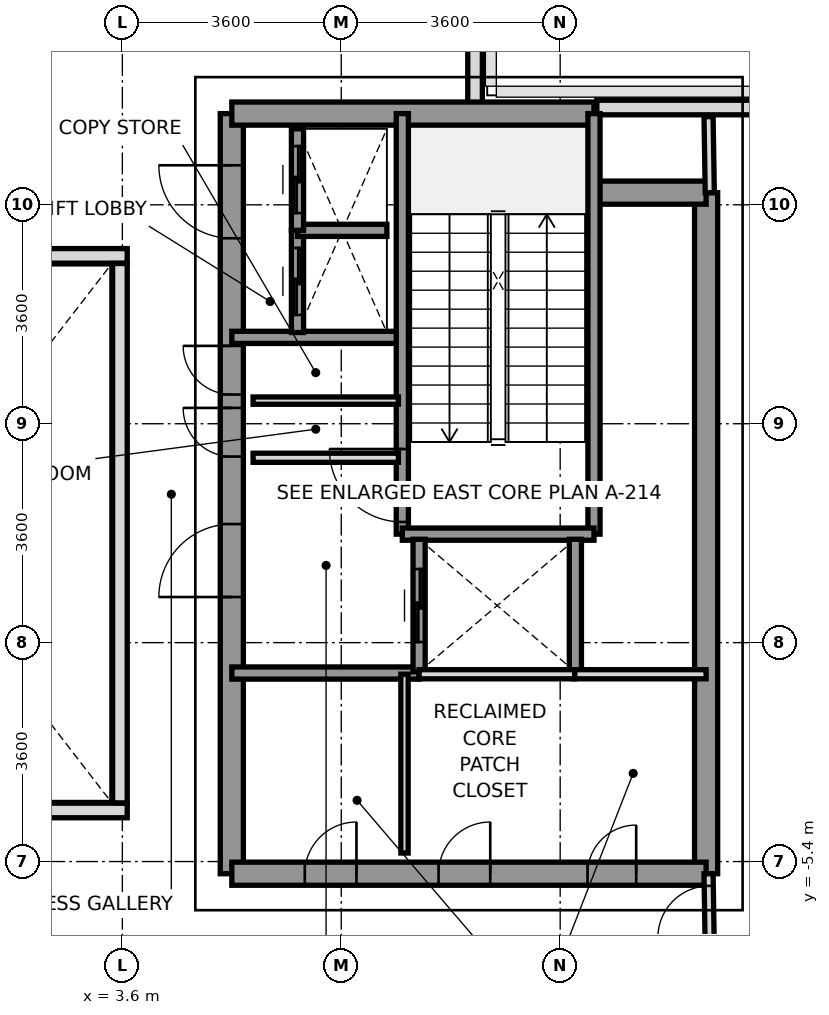
"""IFC4 building model, lengths in metres.
Left out: names, types, materials, properties, quantities, classifications, styles, units other than length and angle.
Written with IfcOpenShell. Run it as: python <this file> out.ifc"""

import sys

from ifc_helpers import new_model, si_unit, direction, frame, frame_2d, origin, place, context, subcontext, project, spatial, rectangle, extrude, source, transform, mapped, element, fill, save


model = new_model("IFC4")
c1 = context("Model", 3, precision=1e-05, world=origin(), true_north=direction((0.0, 1.0)))
c2 = subcontext(c1, "Body", "Model", "MODEL_VIEW")
j1 = project(units=[si_unit("LENGTHUNIT", "METRE"), si_unit("PLANEANGLEUNIT", "RADIAN")], contexts=[c1])
p1 = place(None, origin())
s1 = spatial("IfcSite", under=j1, at=p1, CompositionType="ELEMENT")
p2 = place(p1, origin())
s2 = spatial("IfcBuilding", under=s1, at=p2, CompositionType="ELEMENT")
p3 = place(p2, frame((0.0, 0.0, 214.8)))
s3 = spatial("IfcBuildingStorey", under=s2, at=p3, CompositionType="ELEMENT", Elevation=214.8)
p4 = place(p3, frame((9.4, 8.547, 0.0), z_axis=(0.0, 0.0, 1.0), x_axis=(0.0, -1.0, 0.0)))
e1 = element("IfcWall", 1, at=p4, inside=s3, PredefinedType="PARAPET", context=c2, shape_type="SweptSolid", body=[
    extrude(rectangle(XDim=1.594, YDim=0.24, at=frame_2d((0.797, 0.0))), origin(), (0.0, 0.0, 1.0), 1.15),
])
p5 = place(p3, frame((11.403, 7.0, 0.0), z_axis=(0.0, 0.0, 1.0), x_axis=(1.0, 0.0, 0.0)))
e2 = element("IfcWall", 2, at=p5, inside=s3, PredefinedType="PARAPET", context=c2, shape_type="SweptSolid", body=[
    extrude(rectangle(XDim=2.669, YDim=0.24, at=frame_2d((1.334, 0.0))), origin(), (0.0, 0.0, 1.0), 1.15),
])
p6 = place(p3, frame((13.2, -5.6, 0.0), z_axis=(0.0, 0.0, 1.0), x_axis=(0.0, 1.0, 0.0)))
e3 = element("IfcWall", 3, at=p6, inside=s3, PredefinedType="SHEAR", context=c2, shape_type="SweptSolid", body=[
    extrude(rectangle(XDim=11.2, YDim=0.38, at=frame_2d((5.6, 0.0))), origin(), (0.0, 0.0, 1.0), 4.41),
])
p7 = place(p3, frame((5.4, -5.6, 0.0), z_axis=(0.0, 0.0, 1.0), x_axis=(0.0, 1.0, 0.0)))
e4 = element("IfcWall", 4, at=p7, inside=s3, PredefinedType="SHEAR", context=c2, shape_type="SweptSolid", body=[
    extrude(rectangle(XDim=12.5, YDim=0.38, at=frame_2d((6.25, 0.0))), origin(), (0.0, 0.0, 1.0), 4.41),
])
p8 = place(p7, frame((4.55, 0.0, 0.0)))
e5 = element("IfcOpeningElement", 5, at=p8, cuts=e4, PredefinedType="OPENING", context=c2, shape_type="SweptSolid", body=[
    extrude(rectangle(XDim=1.2, YDim=2.2, at=frame_2d((0.6, 1.1))), frame((0.0, 0.2, 0.0), z_axis=(0.0, -1.0, 0.0), x_axis=(1.0, 0.0, 0.0)), (0.0, 0.0, 1.0), 0.4),
])
p9 = place(p7, frame((10.45, 0.0, 0.0)))
e6 = element("IfcOpeningElement", 6, at=p9, cuts=e4, PredefinedType="OPENING", context=c2, shape_type="SweptSolid", body=[
    extrude(rectangle(XDim=1.2, YDim=2.2, at=frame_2d((0.6, 1.1))), frame((0.0, 0.2, 0.0), z_axis=(0.0, -1.0, 0.0), x_axis=(1.0, 0.0, 0.0)), (0.0, 0.0, 1.0), 0.4),
])
p10 = place(p7, frame((6.86, 0.0, 0.0)))
e7 = element("IfcOpeningElement", 7, at=p10, cuts=e4, PredefinedType="OPENING", context=c2, shape_type="SweptSolid", body=[
    extrude(rectangle(XDim=0.8, YDim=2.1, at=frame_2d((0.4, 1.05))), frame((0.0, 0.2, 0.0), z_axis=(0.0, -1.0, 0.0), x_axis=(1.0, 0.0, 0.0)), (0.0, 0.0, 1.0), 0.4),
])
p11 = place(p7, frame((7.88, 0.0, 0.0)))
e8 = element("IfcOpeningElement", 8, at=p11, cuts=e4, PredefinedType="OPENING", context=c2, shape_type="SweptSolid", body=[
    extrude(rectangle(XDim=0.8, YDim=2.1, at=frame_2d((0.4, 1.05))), frame((0.0, 0.2, 0.0), z_axis=(0.0, -1.0, 0.0), x_axis=(1.0, 0.0, 0.0)), (0.0, 0.0, 1.0), 0.4),
])
p12 = place(p3, frame((5.4, 6.9, 0.0), z_axis=(0.0, 0.0, 1.0), x_axis=(1.0, 0.0, 0.0)))
e9 = element("IfcWall", 9, at=p12, inside=s3, PredefinedType="SHEAR", context=c2, shape_type="SweptSolid", body=[
    extrude(rectangle(XDim=5.956, YDim=0.38, at=frame_2d((2.978, 0.0))), origin(), (0.0, 0.0, 1.0), 4.41),
])
p13 = place(p3, frame((11.356, 5.6, 0.0), z_axis=(0.0, 0.0, 1.0), x_axis=(1.0, 0.0, 0.0)))
e10 = element("IfcWall", 10, at=p13, inside=s3, PredefinedType="SHEAR", context=c2, shape_type="SweptSolid", body=[
    extrude(rectangle(XDim=1.844, YDim=0.38, at=frame_2d((0.922, 0.0))), origin(), (0.0, 0.0, 1.0), 4.41),
])
p14 = place(p3, frame((5.4, -5.6, 0.0), z_axis=(0.0, 0.0, 1.0), x_axis=(1.0, 0.0, 0.0)))
e11 = element("IfcWall", 11, at=p14, inside=s3, PredefinedType="SHEAR", context=c2, shape_type="SweptSolid", body=[
    extrude(rectangle(XDim=7.8, YDim=0.38, at=frame_2d((3.9, 0.0))), origin(), (0.0, 0.0, 1.0), 4.41),
])
p15 = place(p14, frame((5.85, 0.0, 0.0)))
e12 = element("IfcOpeningElement", 12, at=p15, cuts=e11, PredefinedType="OPENING", context=c2, shape_type="SweptSolid", body=[
    extrude(rectangle(XDim=0.8, YDim=2.1, at=frame_2d((0.4, 1.05))), frame((0.0, 0.2, 0.0), z_axis=(0.0, -1.0, 0.0), x_axis=(1.0, 0.0, 0.0)), (0.0, 0.0, 1.0), 0.4),
])
p16 = place(p14, frame((1.2, 0.0, 0.0)))
e13 = element("IfcOpeningElement", 13, at=p16, cuts=e11, PredefinedType="OPENING", context=c2, shape_type="SweptSolid", body=[
    extrude(rectangle(XDim=0.85, YDim=2.1, at=frame_2d((0.425, 1.05))), frame((0.0, 0.2, 0.0), z_axis=(0.0, -1.0, 0.0), x_axis=(1.0, 0.0, 0.0)), (0.0, 0.0, 1.0), 0.4),
])
p17 = place(p14, frame((3.4, 0.0, 0.0)))
e14 = element("IfcOpeningElement", 14, at=p17, cuts=e11, PredefinedType="OPENING", context=c2, shape_type="SweptSolid", body=[
    extrude(rectangle(XDim=0.85, YDim=2.1, at=frame_2d((0.425, 1.05))), frame((0.0, 0.2, 0.0), z_axis=(0.0, -1.0, 0.0), x_axis=(1.0, 0.0, 0.0)), (0.0, 0.0, 1.0), 0.4),
])
p18 = place(p3, frame((5.4, 3.22, 0.0), z_axis=(0.0, 0.0, 1.0), x_axis=(1.0, 0.0, 0.0)))
e15 = element("IfcWall", 15, at=p18, inside=s3, PredefinedType="SOLIDWALL", context=c2, shape_type="SweptSolid", body=[
    extrude(rectangle(XDim=2.78, YDim=0.2, at=frame_2d((1.39, 0.0))), origin(), (0.0, 0.0, 1.0), 4.41),
])
p19 = place(p3, frame((5.4, -2.3, 0.0), z_axis=(0.0, 0.0, 1.0), x_axis=(1.0, 0.0, 0.0)))
e16 = element("IfcWall", 16, at=p19, inside=s3, PredefinedType="SOLIDWALL", context=c2, shape_type="SweptSolid", body=[
    extrude(rectangle(XDim=3.08, YDim=0.2, at=frame_2d((1.54, 0.0))), origin(), (0.0, 0.0, 1.0), 4.41),
])
p20 = place(p3, frame((8.204, -0.016, 0.0), z_axis=(0.0, 0.0, 1.0), x_axis=(0.0, 1.0, 0.0)))
e17 = element("IfcWall", 17, at=p20, inside=s3, PredefinedType="SOLIDWALL", context=c2, shape_type="SweptSolid", body=[
    extrude(rectangle(XDim=6.916, YDim=0.2, at=frame_2d((3.458, 0.0))), origin(), (0.0, 0.0, 1.0), 4.41),
])
p21 = place(p20, frame((0.2, 0.0, 0.0)))
e18 = element("IfcOpeningElement", 18, at=p21, cuts=e17, PredefinedType="OPENING", context=c2, shape_type="SweptSolid", body=[
    extrude(rectangle(XDim=1.2, YDim=2.2, at=frame_2d((0.6, 1.1))), frame((0.0, 0.11, 0.0), z_axis=(0.0, -1.0, 0.0), x_axis=(1.0, 0.0, 0.0)), (0.0, 0.0, 1.0), 0.22),
])
p22 = place(p3, frame((11.356, -0.016, 0.0), z_axis=(0.0, 0.0, 1.0), x_axis=(0.0, 1.0, 0.0)))
e19 = element("IfcWall", 19, at=p22, inside=s3, PredefinedType="SOLIDWALL", context=c2, shape_type="SweptSolid", body=[
    extrude(rectangle(XDim=6.916, YDim=0.2, at=frame_2d((3.458, 0.0))), origin(), (0.0, 0.0, 1.0), 4.41),
])
p23 = place(p3, frame((8.204, -0.016, 0.0), z_axis=(0.0, 0.0, 1.0), x_axis=(1.0, 0.0, 0.0)))
e20 = element("IfcWall", 20, at=p23, inside=s3, PredefinedType="SOLIDWALL", context=c2, shape_type="SweptSolid", body=[
    extrude(rectangle(XDim=3.152, YDim=0.2, at=frame_2d((1.576, 0.0))), origin(), (0.0, 0.0, 1.0), 4.41),
])
p24 = place(p3, frame((8.48, -2.28, 0.0), z_axis=(0.0, 0.0, 1.0), x_axis=(0.0, 1.0, 0.0)))
e21 = element("IfcWall", 21, at=p24, inside=s3, PredefinedType="SOLIDWALL", context=c2, shape_type="SweptSolid", body=[
    extrude(rectangle(XDim=2.18, YDim=0.2, at=frame_2d((1.09, 0.0))), origin(), (0.0, 0.0, 1.0), 4.41),
])
p25 = place(p24, frame((0.49, 0.0, 0.0)))
e22 = element("IfcOpeningElement", 22, at=p25, cuts=e21, PredefinedType="OPENING", context=c2, shape_type="SweptSolid", body=[
    extrude(rectangle(XDim=1.2, YDim=2.2, at=frame_2d((0.6, 1.1))), frame((0.0, 0.11, 0.0), z_axis=(0.0, -1.0, 0.0), x_axis=(1.0, 0.0, 0.0)), (0.0, 0.0, 1.0), 0.22),
])
p26 = place(p3, frame((11.05, -2.28, 0.0), z_axis=(0.0, 0.0, 1.0), x_axis=(0.0, 1.0, 0.0)))
e23 = element("IfcWall", 23, at=p26, inside=s3, PredefinedType="SOLIDWALL", context=c2, shape_type="SweptSolid", body=[
    extrude(rectangle(XDim=2.18, YDim=0.2, at=frame_2d((1.09, 0.0))), origin(), (0.0, 0.0, 1.0), 4.41),
])
p27 = place(p3, frame((6.48, 3.3, 0.0), z_axis=(0.0, 0.0, 1.0), x_axis=(0.0, 1.0, 0.0)))
e24 = element("IfcWall", 24, at=p27, inside=s3, PredefinedType="SOLIDWALL", context=c2, shape_type="SweptSolid", body=[
    extrude(rectangle(XDim=1.68, YDim=0.2, at=frame_2d((0.84, 0.0))), origin(), (0.0, 0.0, 1.0), 4.41),
])
p28 = place(p27, frame((0.29, 0.0, 0.0)))
e25 = element("IfcOpeningElement", 25, at=p28, cuts=e24, PredefinedType="OPENING", context=c2, shape_type="SweptSolid", body=[
    extrude(rectangle(XDim=1.1, YDim=2.2, at=frame_2d((0.55, 1.1))), frame((0.0, 0.11, 0.0), z_axis=(0.0, -1.0, 0.0), x_axis=(1.0, 0.0, 0.0)), (0.0, 0.0, 1.0), 0.22),
])
p29 = place(p3, frame((6.48, 4.98, 0.0), z_axis=(0.0, 0.0, 1.0), x_axis=(1.0, 0.0, 0.0)))
e26 = element("IfcWall", 26, at=p29, inside=s3, PredefinedType="SOLIDWALL", context=c2, shape_type="SweptSolid", body=[
    extrude(rectangle(XDim=1.47, YDim=0.2, at=frame_2d((0.735, 0.0))), origin(), (0.0, 0.0, 1.0), 4.41),
])
p30 = place(p3, frame((6.48, 4.98, 0.0), z_axis=(0.0, 0.0, 1.0), x_axis=(0.0, 1.0, 0.0)))
e27 = element("IfcWall", 27, at=p30, inside=s3, PredefinedType="SOLIDWALL", context=c2, shape_type="SweptSolid", body=[
    extrude(rectangle(XDim=1.67, YDim=0.2, at=frame_2d((0.835, 0.0))), origin(), (0.0, 0.0, 1.0), 4.41),
])
p31 = place(p30, frame((0.285, 0.0, 0.0)))
e28 = element("IfcOpeningElement", 28, at=p31, cuts=e27, PredefinedType="OPENING", context=c2, shape_type="SweptSolid", body=[
    extrude(rectangle(XDim=1.1, YDim=2.2, at=frame_2d((0.55, 1.1))), frame((0.0, 0.11, 0.0), z_axis=(0.0, -1.0, 0.0), x_axis=(1.0, 0.0, 0.0)), (0.0, 0.0, 1.0), 0.22),
])
p32 = place(p3, frame((5.75, 1.24, 0.0), z_axis=(0.0, 0.0, 1.0), x_axis=(1.0, 0.0, 0.0)))
e29 = element("IfcWall", 29, at=p32, inside=s3, PredefinedType="PARTITIONING", context=c2, shape_type="SweptSolid", body=[
    extrude(rectangle(XDim=2.39, YDim=0.15, at=frame_2d((1.195, 0.0))), origin(), (0.0, 0.0, 1.0), 3.51),
])
p33 = place(p3, frame((5.75, 2.18, 0.0), z_axis=(0.0, 0.0, 1.0), x_axis=(1.0, 0.0, 0.0)))
e30 = element("IfcWall", 30, at=p33, inside=s3, PredefinedType="PARTITIONING", context=c2, shape_type="SweptSolid", body=[
    extrude(rectangle(XDim=2.39, YDim=0.12, at=frame_2d((1.195, 0.0))), origin(), (0.0, 0.0, 1.0), 3.51),
])
p34 = place(p3, frame((11.02, -2.32, 0.0), z_axis=(0.0, 0.0, 1.0), x_axis=(1.0, 0.0, 0.0)))
e31 = element("IfcWall", 31, at=p34, inside=s3, PredefinedType="PARTITIONING", context=c2, shape_type="SweptSolid", body=[
    extrude(rectangle(XDim=2.18, YDim=0.15, at=frame_2d((1.09, 0.0))), origin(), (0.0, 0.0, 1.0), 4.41),
])
p35 = place(p3, frame((8.24, -5.26, 0.0), z_axis=(0.0, 0.0, 1.0), x_axis=(0.0, 1.0, 0.0)))
e32 = element("IfcWall", 32, at=p35, inside=s3, PredefinedType="PARTITIONING", context=c2, shape_type="SweptSolid", body=[
    extrude(rectangle(XDim=2.94, YDim=0.12, at=frame_2d((1.47, 0.0))), origin(), (0.0, 0.0, 1.0), 4.41),
])
p36 = place(p3, frame((8.48, -2.32, 0.0), z_axis=(0.0, 0.0, 1.0), x_axis=(1.0, 0.0, 0.0)))
e33 = element("IfcWall", 33, at=p36, inside=s3, PredefinedType="PARTITIONING", context=c2, shape_type="SweptSolid", body=[
    extrude(rectangle(XDim=2.56, YDim=0.15, at=frame_2d((1.28, 0.0))), origin(), (0.0, 0.0, 1.0), 4.41),
])
p37 = place(p3, frame((13.26, -6.85, 0.0), z_axis=(0.0, 0.0, 1.0), x_axis=(-0.016013571389, 0.999871774545, 0.0)))
e34 = element("IfcWall", 34, at=p37, inside=s3, PredefinedType="PARTITIONING", context=c2, shape_type="SweptSolid", body=[
    extrude(rectangle(XDim=1.25, YDim=0.15, at=frame_2d((0.625, 0.0))), origin(), (0.0, 0.0, 1.0), 4.41),
])
p38 = place(p37, frame((0.2, 0.0, 0.0)))
e35 = element("IfcOpeningElement", 35, at=p38, cuts=e34, PredefinedType="OPENING", context=c2, shape_type="SweptSolid", body=[
    extrude(rectangle(XDim=0.85, YDim=2.1, at=frame_2d((0.425, 1.05))), frame((0.0, 0.085, 0.0), z_axis=(0.0, -1.0, 0.0), x_axis=(1.0, 0.0, 0.0)), (0.0, 0.0, 1.0), 0.17),
])
p39 = place(p3, frame((13.26, 5.6, 0.0), z_axis=(0.0, 0.0, 1.0), x_axis=(-0.016013571389, 0.999871774545, 0.0)))
e36 = element("IfcWall", 36, at=p39, inside=s3, PredefinedType="PARTITIONING", context=c2, shape_type="SweptSolid", body=[
    extrude(rectangle(XDim=1.25, YDim=0.15, at=frame_2d((0.625, 0.0))), origin(), (0.0, 0.0, 1.0), 4.41),
])
for number, where, z_axis, x_axis in (
    (37, (-3.68, -4.56, 0.0), (0.0, 0.0, 1.0), (1.0, 0.0, 0.0)),
    (38, (-3.68, 4.56, 0.0), (0.0, 0.0, 1.0), (1.0, 0.0, 0.0)),
):
    element("IfcWall", number, at=place(p3, frame(where, z_axis=z_axis, x_axis=x_axis)), inside=s3, PredefinedType="PARAPET", context=c2, shape_type="SweptSolid", body=[
        extrude(rectangle(XDim=7.36, YDim=0.24, at=frame_2d((3.68, 0.0))), origin(), (0.0, 0.0, 1.0), 1.15),
    ])
p40 = place(p3, frame((3.56, -4.435, 0.0), z_axis=(0.0, 0.0, 1.0), x_axis=(0.0, 1.0, 0.0)))
e39 = element("IfcWall", 39, at=p40, inside=s3, PredefinedType="PARAPET", context=c2, shape_type="SweptSolid", body=[
    extrude(rectangle(XDim=8.87, YDim=0.24, at=frame_2d((4.435, 0.0))), origin(), (0.0, 0.0, 1.0), 1.15),
])
m1 = source(origin(), c2, "Body", "SweptSolid", [
    extrude(rectangle(XDim=1.2, YDim=2.2, at=frame_2d((0.6, 1.1))), frame((0.0, 0.025, 0.0), z_axis=(0.0, -1.0, 0.0), x_axis=(1.0, 0.0, 0.0)), (0.0, 0.0, 1.0), 0.05),
])
p41 = place(p21, origin())
e40 = element("IfcDoor", 40, at=p41, inside=s3, OperationType="SINGLE_SWING_RIGHT", PredefinedType="DOOR", context=c2, shape_type="MappedRepresentation", body=[
    mapped(m1, transform((0.0, 0.0, 0.0), x_axis=(1.0, 0.0, 0.0), y_axis=(0.0, 1.0, 0.0), z_axis=(0.0, 0.0, 1.0), scale=1.0)),
])
fill(e18, e40)
p42 = place(p8, origin())
e41 = element("IfcDoor", 41, at=p42, inside=s3, OperationType="SINGLE_SWING_LEFT", PredefinedType="DOOR", context=c2, shape_type="MappedRepresentation", body=[
    mapped(m1, transform((0.0, 0.0, 0.0), x_axis=(1.0, 0.0, 0.0), y_axis=(0.0, 1.0, 0.0), z_axis=(0.0, 0.0, 1.0), scale=1.0)),
])
fill(e5, e41)
p43 = place(p9, origin())
e42 = element("IfcDoor", 42, at=p43, inside=s3, OperationType="SINGLE_SWING_RIGHT", PredefinedType="DOOR", context=c2, shape_type="MappedRepresentation", body=[
    mapped(m1, transform((0.0, 0.0, 0.0), x_axis=(1.0, 0.0, 0.0), y_axis=(0.0, 1.0, 0.0), z_axis=(0.0, 0.0, 1.0), scale=1.0)),
])
fill(e6, e42)
m2 = source(origin(), c2, "Body", "SweptSolid", [
    extrude(rectangle(XDim=0.8, YDim=2.1, at=frame_2d((0.4, 1.05))), frame((0.0, 0.025, 0.0), z_axis=(0.0, -1.0, 0.0), x_axis=(1.0, 0.0, 0.0)), (0.0, 0.0, 1.0), 0.05),
])
p44 = place(p10, origin())
e43 = element("IfcDoor", 43, at=p44, inside=s3, OperationType="SINGLE_SWING_RIGHT", PredefinedType="DOOR", context=c2, shape_type="MappedRepresentation", body=[
    mapped(m2, transform((0.0, 0.0, 0.0), x_axis=(1.0, 0.0, 0.0), y_axis=(0.0, 1.0, 0.0), z_axis=(0.0, 0.0, 1.0), scale=1.0)),
])
fill(e7, e43)
p45 = place(p11, origin())
e44 = element("IfcDoor", 44, at=p45, inside=s3, OperationType="SINGLE_SWING_RIGHT", PredefinedType="DOOR", context=c2, shape_type="MappedRepresentation", body=[
    mapped(m2, transform((0.0, 0.0, 0.0), x_axis=(1.0, 0.0, 0.0), y_axis=(0.0, 1.0, 0.0), z_axis=(0.0, 0.0, 1.0), scale=1.0)),
])
fill(e8, e44)
p46 = place(p15, origin())
e45 = element("IfcDoor", 45, at=p46, inside=s3, OperationType="SINGLE_SWING_RIGHT", PredefinedType="DOOR", context=c2, shape_type="MappedRepresentation", body=[
    mapped(m2, transform((0.0, 0.0, 0.0), x_axis=(1.0, 0.0, 0.0), y_axis=(0.0, 1.0, 0.0), z_axis=(0.0, 0.0, 1.0), scale=1.0)),
])
fill(e12, e45)
m3 = source(origin(), c2, "Body", "SweptSolid", [
    extrude(rectangle(XDim=0.85, YDim=2.1, at=frame_2d((0.425, 1.05))), frame((0.0, 0.025, 0.0), z_axis=(0.0, -1.0, 0.0), x_axis=(1.0, 0.0, 0.0)), (0.0, 0.0, 1.0), 0.05),
])
p47 = place(p16, origin())
e46 = element("IfcDoor", 46, at=p47, inside=s3, OperationType="SINGLE_SWING_RIGHT", PredefinedType="DOOR", context=c2, shape_type="MappedRepresentation", body=[
    mapped(m3, transform((0.0, 0.0, 0.0), x_axis=(1.0, 0.0, 0.0), y_axis=(0.0, 1.0, 0.0), z_axis=(0.0, 0.0, 1.0), scale=1.0)),
])
fill(e13, e46)
p48 = place(p17, origin())
e47 = element("IfcDoor", 47, at=p48, inside=s3, OperationType="SINGLE_SWING_RIGHT", PredefinedType="DOOR", context=c2, shape_type="MappedRepresentation", body=[
    mapped(m3, transform((0.0, 0.0, 0.0), x_axis=(1.0, 0.0, 0.0), y_axis=(0.0, 1.0, 0.0), z_axis=(0.0, 0.0, 1.0), scale=1.0)),
])
fill(e14, e47)
p49 = place(p25, origin())
e48 = element("IfcDoor", 48, at=p49, inside=s3, OperationType="SLIDING_TO_RIGHT", PredefinedType="DOOR", context=c2, shape_type="MappedRepresentation", body=[
    mapped(m1, transform((0.0, 0.0, 0.0), x_axis=(1.0, 0.0, 0.0), y_axis=(0.0, 1.0, 0.0), z_axis=(0.0, 0.0, 1.0), scale=1.0)),
])
fill(e22, e48)
m4 = source(origin(), c2, "Body", "SweptSolid", [
    extrude(rectangle(XDim=1.1, YDim=2.2, at=frame_2d((0.55, 1.1))), frame((0.0, 0.025, 0.0), z_axis=(0.0, -1.0, 0.0), x_axis=(1.0, 0.0, 0.0)), (0.0, 0.0, 1.0), 0.05),
])
p50 = place(p28, origin())
e49 = element("IfcDoor", 49, at=p50, inside=s3, OperationType="SLIDING_TO_LEFT", PredefinedType="DOOR", context=c2, shape_type="MappedRepresentation", body=[
    mapped(m4, transform((0.0, 0.0, 0.0), x_axis=(1.0, 0.0, 0.0), y_axis=(0.0, 1.0, 0.0), z_axis=(0.0, 0.0, 1.0), scale=1.0)),
])
fill(e25, e49)
p51 = place(p31, origin())
e50 = element("IfcDoor", 50, at=p51, inside=s3, OperationType="SLIDING_TO_LEFT", PredefinedType="DOOR", context=c2, shape_type="MappedRepresentation", body=[
    mapped(m4, transform((0.0, 0.0, 0.0), x_axis=(1.0, 0.0, 0.0), y_axis=(0.0, 1.0, 0.0), z_axis=(0.0, 0.0, 1.0), scale=1.0)),
])
fill(e28, e50)
p52 = place(p38, origin())
e51 = element("IfcDoor", 51, at=p52, inside=s3, OperationType="SINGLE_SWING_LEFT", PredefinedType="DOOR", context=c2, shape_type="MappedRepresentation", body=[
    mapped(m3, transform((0.0, 0.0, 0.0), x_axis=(1.0, 0.0, 0.0), y_axis=(0.0, 1.0, 0.0), z_axis=(0.0, 0.0, 1.0), scale=1.0)),
])
fill(e35, e51)
save(model, sys.argv[1])
